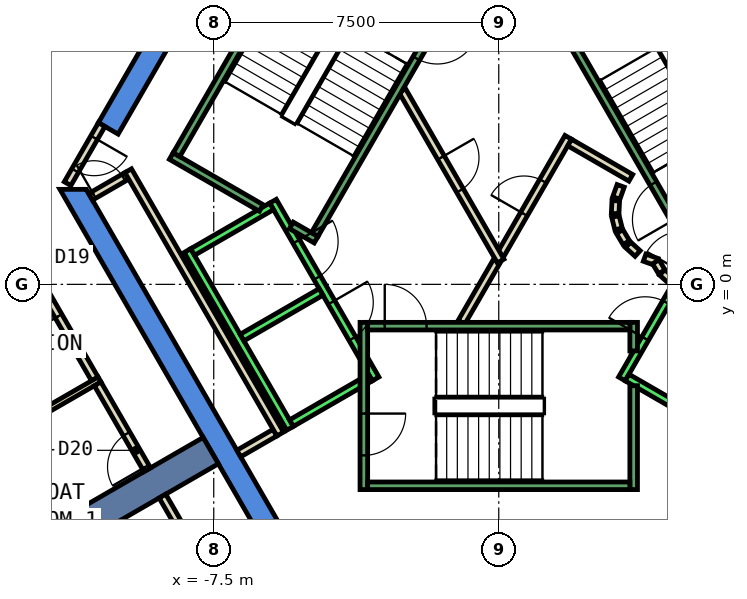
"""IFC4 building model, lengths in metres.
Left out: names, types, materials, properties, quantities, classifications, styles, units other than length and angle.
Written with IfcOpenShell. Run it as: python <this file> out.ifc"""

import sys

from ifc_helpers import new_model, si_unit, direction, frame, frame_2d, origin, place, context, subcontext, project, spatial, polyline, rectangle, outline, extrude, element, fill, save


model = new_model("IFC4")
c1 = context("Model", 3, precision=1e-05, world=origin(), true_north=direction((0.0, 1.0)))
c2 = subcontext(c1, "Body", "Model", "MODEL_VIEW")
j1 = project(units=[si_unit("LENGTHUNIT", "METRE"), si_unit("PLANEANGLEUNIT", "RADIAN")], contexts=[c1])
p1 = place(None, origin())
s1 = spatial("IfcSite", under=j1, at=p1, CompositionType="ELEMENT")
p2 = place(p1, origin())
s2 = spatial("IfcBuilding", under=s1, at=p2, CompositionType="ELEMENT")
p3 = place(p2, frame((0.0, 0.0, 241.4)))
s3 = spatial("IfcBuildingStorey", under=s2, at=p3, CompositionType="ELEMENT", Elevation=241.4)
p4 = place(p3, frame((0.0, 0.0, -0.6)))
e1 = element("IfcWall", 1, at=p4, inside=s3, PredefinedType="SHEAR", context=c2, shape_type="SweptSolid", body=[
    extrude(outline(polyline([(-10.535, 4.253), (-10.015, 3.953), (-5.427, 11.9), (-5.774, 12.5), (-10.535, 4.253)])), origin(), (0.0, 0.0, 1.0), 3.86),
])
p5 = place(p3, frame((0.0, 0.0, -0.6)))
e2 = element("IfcWall", 2, at=p5, inside=s3, PredefinedType="SHEAR", context=c2, shape_type="SweptSolid", body=[
    extrude(outline(polyline([(-11.547, 2.5), (-5.774, -7.5), (-5.427, -6.9), (-10.854, 2.5), (-11.547, 2.5)])), origin(), (0.0, 0.0, 1.0), 3.86),
])
p6 = place(p3, frame((-7.578, -4.375, -0.6), z_axis=(0.0, 0.0, 1.0), x_axis=(-0.866024315419, -0.5000018851, 0.0)))
e3 = element("IfcWall", 3, at=p6, inside=s3, PredefinedType="SHEAR", context=c2, shape_type="SweptSolid", body=[
    extrude(rectangle(XDim=9.0, YDim=0.8, at=frame_2d((4.5, 0.0))), origin(), (0.0, 0.0, 1.0), 3.86),
])
p7 = place(p3, frame((-10.63, -2.488, 0.0), z_axis=(0.0, 0.0, 1.0), x_axis=(-0.500108649621, 0.865962665808, 0.0)))
e4 = element("IfcWall", 4, at=p7, inside=s3, PredefinedType="PARTITIONING", context=c2, shape_type="SweptSolid", body=[
    extrude(rectangle(XDim=4.815, YDim=0.2, at=frame_2d((2.408, 0.0))), origin(), (0.0, 0.0, 1.0), 3.26),
])
p8 = place(p7, frame((1.908, 0.0, 0.0)))
e5 = element("IfcOpeningElement", 5, at=p8, cuts=e4, PredefinedType="OPENING", context=c2, shape_type="SweptSolid", body=[
    extrude(rectangle(XDim=1.0, YDim=2.1, at=frame_2d((0.5, 1.05))), frame((0.0, 0.11, 0.0), z_axis=(0.0, -1.0, 0.0), x_axis=(1.0, 0.0, 0.0)), (0.0, 0.0, 1.0), 0.22),
])
p9 = place(p3, frame((-8.235, -6.636, 0.0), z_axis=(0.0, 0.0, 1.0), x_axis=(-0.500089055364, 0.86597398154, 0.0)))
e6 = element("IfcWall", 6, at=p9, inside=s3, PredefinedType="PARTITIONING", context=c2, shape_type="SweptSolid", body=[
    extrude(rectangle(XDim=1.23, YDim=0.2, at=frame_2d((0.615, 0.0))), origin(), (0.0, 0.0, 1.0), 3.26),
])
p10 = place(p3, frame((-5.888, -3.902, 0.0), z_axis=(0.0, 0.0, 1.0), x_axis=(-0.86621513555, -0.499671230855, 0.0)))
e7 = element("IfcWall", 7, at=p10, inside=s3, PredefinedType="PARTITIONING", context=c2, shape_type="SweptSolid", body=[
    extrude(rectangle(XDim=1.1, YDim=0.2, at=frame_2d((0.55, 0.0))), origin(), (0.0, 0.0, 1.0), 3.26),
])
p11 = place(p3, frame((-10.741, 2.303, 0.0), z_axis=(0.0, 0.0, 1.0), x_axis=(0.866063652425, 0.499933745558, 0.0)))
e8 = element("IfcWall", 8, at=p11, inside=s3, PredefinedType="PARTITIONING", context=c2, shape_type="SweptSolid", body=[
    extrude(rectangle(XDim=1.1, YDim=0.2, at=frame_2d((0.55, 0.0))), origin(), (0.0, 0.0, 1.0), 3.26),
])
p12 = place(p11, frame((0.1, 0.0, 0.0)))
e9 = element("IfcOpeningElement", 9, at=p12, cuts=e8, PredefinedType="OPENING", context=c2, shape_type="SweptSolid", body=[
    extrude(rectangle(XDim=0.9, YDim=2.1, at=frame_2d((0.45, 1.05))), frame((0.0, 0.11, 0.0), z_axis=(0.0, -1.0, 0.0), x_axis=(1.0, 0.0, 0.0)), (0.0, 0.0, 1.0), 0.22),
])
p13 = place(p3, frame((-9.751, 2.99, 0.0), z_axis=(0.0, 0.0, 1.0), x_axis=(0.500012163284, -0.866018381195, 0.0)))
e10 = element("IfcWall", 10, at=p13, inside=s3, PredefinedType="PARTITIONING", context=c2, shape_type="SweptSolid", body=[
    extrude(rectangle(XDim=8.0, YDim=0.2, at=frame_2d((4.0, 0.0))), origin(), (0.0, 0.0, 1.0), 3.26),
])
p14 = place(p3, frame((-0.982, -1.0, 0.0), z_axis=(0.0, 0.0, 1.0), x_axis=(0.50024047865, 0.865886518847, 0.0)))
e11 = element("IfcWall", 11, at=p14, inside=s3, PredefinedType="PARTITIONING", context=c2, shape_type="SweptSolid", body=[
    extrude(rectangle(XDim=1.863, YDim=0.2, at=frame_2d((0.931, 0.0))), origin(), (0.0, 0.0, 1.0), 3.26),
])
p15 = place(p3, frame((0.05, 0.787, 0.0), z_axis=(0.0, 0.0, 1.0), x_axis=(0.499954076797, 0.866051915934, 0.0)))
e12 = element("IfcWall", 12, at=p15, inside=s3, PredefinedType="PARTITIONING", context=c2, shape_type="SweptSolid", body=[
    extrude(rectangle(XDim=3.558, YDim=0.2, at=frame_2d((1.779, 0.0))), origin(), (0.0, 0.0, 1.0), 3.26),
])
p16 = place(p15, frame((1.229, 0.0, 0.0)))
e13 = element("IfcOpeningElement", 13, at=p16, cuts=e12, PredefinedType="OPENING", context=c2, shape_type="SweptSolid", body=[
    extrude(rectangle(XDim=1.0, YDim=2.1, at=frame_2d((0.5, 1.05))), frame((0.0, 0.11, 0.0), z_axis=(0.0, -1.0, 0.0), x_axis=(1.0, 0.0, 0.0)), (0.0, 0.0, 1.0), 0.22),
])
p17 = place(p3, frame((1.866, 3.732, 0.0), z_axis=(0.0, 0.0, 1.0), x_axis=(0.866043361281, -0.499968895414, 0.0)))
e14 = element("IfcWall", 14, at=p17, inside=s3, PredefinedType="PARTITIONING", context=c2, shape_type="SweptSolid", body=[
    extrude(rectangle(XDim=1.858, YDim=0.2, at=frame_2d((0.929, 0.0))), origin(), (0.0, 0.0, 1.0), 3.26),
])
p18 = place(p3, frame((3.208, 2.592, 0.0), z_axis=(0.0, 0.0, 1.0), x_axis=(-0.337388820924, -0.941365382578, 0.0)))
e15 = element("IfcWall", 15, at=p18, inside=s3, PredefinedType="PARTITIONING", context=c2, shape_type="SweptSolid", body=[
    extrude(rectangle(XDim=0.338, YDim=0.2, at=frame_2d((0.169, 0.0))), origin(), (0.0, 0.0, 1.0), 3.26),
])
p19 = place(p3, frame((3.079, 2.199, 0.0), z_axis=(0.0, 0.0, 1.0), x_axis=(-0.047771483479, -0.998858290933, 0.0)))
e16 = element("IfcWall", 16, at=p19, inside=s3, PredefinedType="PARTITIONING", context=c2, shape_type="SweptSolid", body=[
    extrude(rectangle(XDim=0.337, YDim=0.2, at=frame_2d((0.169, 0.0))), origin(), (0.0, 0.0, 1.0), 3.26),
])
p20 = place(p3, frame((3.07, 1.786, 0.0), z_axis=(0.0, 0.0, 1.0), x_axis=(0.242705583207, -0.970099994784, 0.0)))
e17 = element("IfcWall", 17, at=p20, inside=s3, PredefinedType="PARTITIONING", context=c2, shape_type="SweptSolid", body=[
    extrude(rectangle(XDim=0.338, YDim=0.2, at=frame_2d((0.169, 0.0))), origin(), (0.0, 0.0, 1.0), 3.26),
])
for number, where, z_axis, x_axis in (
    (18, (3.182, 1.388, 0.0), (0.0, 0.0, 1.0), (0.512, -0.859, 0.0)),
    (19, (3.404, 1.039, 0.0), (0.0, 0.0, 1.0), (0.74, -0.672, 0.0)),
):
    element("IfcWall", number, at=place(p3, frame(where, z_axis=z_axis, x_axis=x_axis)), inside=s3, PredefinedType="PARTITIONING", context=c2, shape_type="SweptSolid", body=[
        extrude(rectangle(XDim=0.338, YDim=0.2, at=frame_2d((0.169, 0.0))), origin(), (0.0, 0.0, 1.0), 3.26),
    ])
p21 = place(p3, frame((3.838, 0.702, 0.0), z_axis=(0.0, 0.0, 1.0), x_axis=(0.941035081519, -0.338308993895, 0.0)))
e20 = element("IfcWall", 20, at=p21, inside=s3, PredefinedType="PARTITIONING", context=c2, shape_type="SweptSolid", body=[
    extrude(rectangle(XDim=0.337, YDim=0.2, at=frame_2d((0.168, 0.0))), origin(), (0.0, 0.0, 1.0), 3.26),
])
p22 = place(p3, frame((4.132, 0.593, 0.0), z_axis=(0.0, 0.0, 1.0), x_axis=(0.513561617048, -0.858052717201, 0.0)))
e21 = element("IfcWall", 21, at=p22, inside=s3, PredefinedType="PARTITIONING", context=c2, shape_type="SweptSolid", body=[
    extrude(rectangle(XDim=0.308, YDim=0.2, at=frame_2d((0.154, 0.0))), origin(), (0.0, 0.0, 1.0), 3.26),
])
p23 = place(p3, frame((4.301, 0.315, 0.0), z_axis=(0.0, 0.0, 1.0), x_axis=(0.741798017506, -0.670623367639, 0.0)))
e22 = element("IfcWall", 22, at=p23, inside=s3, PredefinedType="PARTITIONING", context=c2, shape_type="SweptSolid", body=[
    extrude(rectangle(XDim=0.309, YDim=0.2, at=frame_2d((0.154, 0.0))), origin(), (0.0, 0.0, 1.0), 3.26),
])
p24 = place(p3, frame((-2.54, 5.1, 0.0), z_axis=(0.0, 0.0, 1.0), x_axis=(0.499925051871, -0.866068670783, 0.0)))
e23 = element("IfcWall", 23, at=p24, inside=s3, PredefinedType="PARTITIONING", context=c2, shape_type="SweptSolid", body=[
    extrude(rectangle(XDim=5.181, YDim=0.2, at=frame_2d((2.59, 0.0))), origin(), (0.0, 0.0, 1.0), 3.26),
])
p25 = place(p24, frame((2.04, 0.0, 0.0)))
e24 = element("IfcOpeningElement", 24, at=p25, cuts=e23, PredefinedType="OPENING", context=c2, shape_type="SweptSolid", body=[
    extrude(rectangle(XDim=1.0, YDim=2.1, at=frame_2d((0.5, 1.05))), frame((0.0, 0.11, 0.0), z_axis=(0.0, -1.0, 0.0), x_axis=(1.0, 0.0, 0.0)), (0.0, 0.0, 1.0), 0.22),
])
p26 = place(p3, frame((-10.506, -2.503, 0.0), z_axis=(0.0, 0.0, 1.0), x_axis=(-0.866044872465, -0.49996627774, 0.0)))
e25 = element("IfcWall", 25, at=p26, inside=s3, PredefinedType="PARTITIONING", context=c2, shape_type="SweptSolid", body=[
    extrude(rectangle(XDim=5.2, YDim=0.15, at=frame_2d((2.6, 0.0))), origin(), (0.0, 0.0, 1.0), 3.26),
])
p27 = place(p3, frame((-10.449, 4.203, 0.0), z_axis=(0.0, 0.0, 1.0), x_axis=(-0.499914839587, -0.866074565589, 0.0)))
e26 = element("IfcWall", 26, at=p27, inside=s3, PredefinedType="PARTITIONING", context=c2, shape_type="SweptSolid", body=[
    extrude(rectangle(XDim=1.794, YDim=0.2, at=frame_2d((0.897, 0.0))), origin(), (0.0, 0.0, 1.0), 2.4),
])
p28 = place(p27, frame((0.397, 0.0, 0.0)))
e27 = element("IfcOpeningElement", 27, at=p28, cuts=e26, PredefinedType="OPENING", context=c2, shape_type="SweptSolid", body=[
    extrude(rectangle(XDim=1.0, YDim=2.1, at=frame_2d((0.5, 1.05))), frame((0.0, 0.11, 0.0), z_axis=(0.0, -1.0, 0.0), x_axis=(1.0, 0.0, 0.0)), (0.0, 0.0, 1.0), 0.22),
])
p29 = place(p3, frame((-9.25, -4.878, 0.0), z_axis=(0.0, 0.0, 1.0), x_axis=(-0.500032875382, 0.866006422342, 0.0)))
e28 = element("IfcWall", 28, at=p29, inside=s3, PredefinedType="PARTITIONING", context=c2, shape_type="SweptSolid", body=[
    extrude(rectangle(XDim=2.61, YDim=0.2, at=frame_2d((1.305, 0.0))), origin(), (0.0, 0.0, 1.0), 3.26),
])
p30 = place(p29, frame((0.09, 0.0, 0.0)))
e29 = element("IfcOpeningElement", 29, at=p30, cuts=e28, PredefinedType="OPENING", context=c2, shape_type="SweptSolid", body=[
    extrude(rectangle(XDim=1.0, YDim=2.1, at=frame_2d((0.5, 1.05))), frame((0.0, 0.11, 0.0), z_axis=(0.0, -1.0, 0.0), x_axis=(1.0, 0.0, 0.0)), (0.0, 0.0, 1.0), 0.22),
])
p31 = place(p3, frame((-5.94, 2.188, 0.0), z_axis=(0.0, 0.0, 1.0), x_axis=(0.500034260056, -0.866005622828, 0.0)))
e30 = element("IfcWall", 30, at=p31, inside=s3, PredefinedType="STANDARD", context=c2, shape_type="SweptSolid", body=[
    extrude(rectangle(XDim=5.399, YDim=0.2, at=frame_2d((2.7, 0.0))), origin(), (0.0, 0.0, 1.0), 3.26),
])
p32 = place(p31, frame((3.075, 0.0, 0.0)))
e31 = element("IfcOpeningElement", 31, at=p32, cuts=e30, PredefinedType="OPENING", context=c2, shape_type="SweptSolid", body=[
    extrude(rectangle(XDim=1.1, YDim=2.1, at=frame_2d((0.55, 1.05))), frame((0.0, 0.11, 0.0), z_axis=(0.0, -1.0, 0.0), x_axis=(1.0, 0.0, 0.0)), (0.0, 0.0, 1.0), 0.22),
])
p33 = place(p31, frame((1.225, 0.0, 0.0)))
e32 = element("IfcOpeningElement", 32, at=p33, cuts=e30, PredefinedType="OPENING", context=c2, shape_type="SweptSolid", body=[
    extrude(rectangle(XDim=1.1, YDim=2.1, at=frame_2d((0.55, 1.05))), frame((0.0, 0.11, 0.0), z_axis=(0.0, -1.0, 0.0), x_axis=(1.0, 0.0, 0.0)), (0.0, 0.0, 1.0), 0.22),
])
p34 = place(p3, frame((-8.192, 0.888, 0.0), z_axis=(0.0, 0.0, 1.0), x_axis=(0.500034260056, -0.866005622828, 0.0)))
e33 = element("IfcWall", 33, at=p34, inside=s3, PredefinedType="STANDARD", context=c2, shape_type="SweptSolid", body=[
    extrude(rectangle(XDim=5.399, YDim=0.2, at=frame_2d((2.7, 0.0))), origin(), (0.0, 0.0, 1.0), 3.26),
])
for number, where, z_axis, x_axis in (
    (34, (-5.977, 2.052, 0.0), (0.0, 0.0, 1.0), (-0.866, -0.5, 0.0)),
    (35, (-4.677, -0.2, 0.0), (0.0, 0.0, 1.0), (-0.866, -0.5, 0.0)),
):
    element("IfcWall", number, at=place(p3, frame(where, z_axis=z_axis, x_axis=x_axis)), inside=s3, PredefinedType="STANDARD", context=c2, shape_type="SweptSolid", body=[
        extrude(rectangle(XDim=2.399, YDim=0.2, at=frame_2d((1.2, 0.0))), origin(), (0.0, 0.0, 1.0), 3.26),
    ])
p35 = place(p3, frame((-3.377, -2.452, 0.0), z_axis=(0.0, 0.0, 1.0), x_axis=(-0.865955154139, -0.50012165622, 0.0)))
e36 = element("IfcWall", 36, at=p35, inside=s3, PredefinedType="STANDARD", context=c2, shape_type="SweptSolid", body=[
    extrude(rectangle(XDim=2.4, YDim=0.2, at=frame_2d((1.2, 0.0))), origin(), (0.0, 0.0, 1.0), 3.26),
])
p36 = place(p3, frame((3.24, -2.488, 0.0), z_axis=(0.0, 0.0, 1.0), x_axis=(0.500034260056, 0.866005622828, 0.0)))
e37 = element("IfcWall", 37, at=p36, inside=s3, PredefinedType="STANDARD", context=c2, shape_type="SweptSolid", body=[
    extrude(rectangle(XDim=5.399, YDim=0.2, at=frame_2d((2.7, 0.0))), origin(), (0.0, 0.0, 1.0), 3.26),
])
p37 = place(p36, frame((3.225, 0.0, 0.0)))
e38 = element("IfcOpeningElement", 38, at=p37, cuts=e37, PredefinedType="OPENING", context=c2, shape_type="SweptSolid", body=[
    extrude(rectangle(XDim=1.1, YDim=2.1, at=frame_2d((0.55, 1.05))), frame((0.0, 0.11, 0.0), z_axis=(0.0, -1.0, 0.0), x_axis=(1.0, 0.0, 0.0)), (0.0, 0.0, 1.0), 0.22),
])
p38 = place(p36, frame((1.225, 0.0, 0.0)))
e39 = element("IfcOpeningElement", 39, at=p38, cuts=e37, PredefinedType="OPENING", context=c2, shape_type="SweptSolid", body=[
    extrude(rectangle(XDim=1.1, YDim=2.1, at=frame_2d((0.55, 1.05))), frame((0.0, 0.11, 0.0), z_axis=(0.0, -1.0, 0.0), x_axis=(1.0, 0.0, 0.0)), (0.0, 0.0, 1.0), 0.22),
])
p39 = place(p3, frame((3.377, -2.452, 0.0), z_axis=(0.0, 0.0, 1.0), x_axis=(0.865955154139, -0.50012165622, 0.0)))
e40 = element("IfcWall", 40, at=p39, inside=s3, PredefinedType="STANDARD", context=c2, shape_type="SweptSolid", body=[
    extrude(rectangle(XDim=2.4, YDim=0.2, at=frame_2d((1.2, 0.0))), origin(), (0.0, 0.0, 1.0), 3.26),
])
p40 = place(p3, frame((-3.55, -1.0, 0.0), z_axis=(0.0, 0.0, 1.0), x_axis=(0.0, -1.0, 0.0)))
e41 = element("IfcWall", 41, at=p40, inside=s3, PredefinedType="STANDARD", context=c2, shape_type="SweptSolid", body=[
    extrude(rectangle(XDim=4.4, YDim=0.2, at=frame_2d((2.2, 0.0))), origin(), (0.0, 0.0, 1.0), 3.26),
])
p41 = place(p40, frame((2.4, 0.0, 0.0)))
e42 = element("IfcOpeningElement", 42, at=p41, cuts=e41, PredefinedType="OPENING", context=c2, shape_type="SweptSolid", body=[
    extrude(rectangle(XDim=1.1, YDim=2.2, at=frame_2d((0.55, 1.1))), frame((0.0, 0.11, 0.0), z_axis=(0.0, -1.0, 0.0), x_axis=(1.0, 0.0, 0.0)), (0.0, 0.0, 1.0), 0.22),
])
p42 = place(p3, frame((3.55, -2.667, 0.0), z_axis=(0.0, 0.0, 1.0), x_axis=(0.0, -1.0, 0.0)))
e43 = element("IfcWall", 43, at=p42, inside=s3, PredefinedType="STANDARD", context=c2, shape_type="SweptSolid", body=[
    extrude(rectangle(XDim=2.733, YDim=0.2, at=frame_2d((1.366, 0.0))), origin(), (0.0, 0.0, 1.0), 3.26),
])
p43 = place(p3, frame((3.55, -1.0, 0.0), z_axis=(0.0, 0.0, 1.0), x_axis=(0.0, -1.0, 0.0)))
e44 = element("IfcWall", 44, at=p43, inside=s3, PredefinedType="STANDARD", context=c2, shape_type="SweptSolid", body=[
    extrude(rectangle(XDim=0.751, YDim=0.2, at=frame_2d((0.375, 0.0))), origin(), (0.0, 0.0, 1.0), 3.26),
])
p44 = place(p3, frame((-3.45, -1.1, 0.0), z_axis=(0.0, 0.0, 1.0), x_axis=(1.0, 0.0, 0.0)))
e45 = element("IfcWall", 45, at=p44, inside=s3, PredefinedType="STANDARD", context=c2, shape_type="SweptSolid", body=[
    extrude(rectangle(XDim=6.9, YDim=0.2, at=frame_2d((3.45, 0.0))), origin(), (0.0, 0.0, 1.0), 3.26),
])
p45 = place(p44, frame((0.45, 0.0, 0.0)))
e46 = element("IfcOpeningElement", 46, at=p45, cuts=e45, PredefinedType="OPENING", context=c2, shape_type="SweptSolid", body=[
    extrude(rectangle(XDim=1.1, YDim=2.2, at=frame_2d((0.55, 1.1))), frame((0.0, 0.11, 0.0), z_axis=(0.0, -1.0, 0.0), x_axis=(1.0, 0.0, 0.0)), (0.0, 0.0, 1.0), 0.22),
])
p46 = place(p3, frame((-3.45, -5.3, 0.0), z_axis=(0.0, 0.0, 1.0), x_axis=(1.0, 0.0, 0.0)))
e47 = element("IfcWall", 47, at=p46, inside=s3, PredefinedType="STANDARD", context=c2, shape_type="SweptSolid", body=[
    extrude(rectangle(XDim=6.9, YDim=0.2, at=frame_2d((3.45, 0.0))), origin(), (0.0, 0.0, 1.0), 3.26),
])
p47 = place(p3, frame((4.843, 1.312, 0.0), z_axis=(0.0, 0.0, 1.0), x_axis=(-0.499963383562, 0.866046543262, 0.0)))
e48 = element("IfcWall", 48, at=p47, inside=s3, PredefinedType="STANDARD", context=c2, shape_type="SweptSolid", body=[
    extrude(rectangle(XDim=6.9, YDim=0.2, at=frame_2d((3.45, 0.0))), origin(), (0.0, 0.0, 1.0), 3.26),
])
p48 = place(p47, frame((0.45, 0.0, 0.0)))
e49 = element("IfcOpeningElement", 49, at=p48, cuts=e48, PredefinedType="OPENING", context=c2, shape_type="SweptSolid", body=[
    extrude(rectangle(XDim=1.1, YDim=2.2, at=frame_2d((0.55, 1.1))), frame((0.0, 0.11, 0.0), z_axis=(0.0, -1.0, 0.0), x_axis=(1.0, 0.0, 0.0)), (0.0, 0.0, 1.0), 0.22),
])
p49 = place(p3, frame((-6.25, 2.01, 0.0), z_axis=(0.0, 0.0, 1.0), x_axis=(-0.86611865017, 0.499838457731, 0.0)))
e50 = element("IfcWall", 50, at=p49, inside=s3, PredefinedType="STANDARD", context=c2, shape_type="SweptSolid", body=[
    extrude(rectangle(XDim=2.733, YDim=0.2, at=frame_2d((1.366, 0.0))), origin(), (0.0, 0.0, 1.0), 3.26),
])
p50 = place(p3, frame((-4.806, 1.176, 0.0), z_axis=(0.0, 0.0, 1.0), x_axis=(-0.866558586415, 0.499075361355, 0.0)))
e51 = element("IfcWall", 51, at=p50, inside=s3, PredefinedType="STANDARD", context=c2, shape_type="SweptSolid", body=[
    extrude(rectangle(XDim=0.751, YDim=0.2, at=frame_2d((0.376, 0.0))), origin(), (0.0, 0.0, 1.0), 3.26),
])
p51 = place(p3, frame((-1.393, 7.288, 0.0), z_axis=(0.0, 0.0, 1.0), x_axis=(-0.499963383562, -0.866046543262, 0.0)))
e52 = element("IfcWall", 52, at=p51, inside=s3, PredefinedType="STANDARD", context=c2, shape_type="SweptSolid", body=[
    extrude(rectangle(XDim=6.9, YDim=0.2, at=frame_2d((3.45, 0.0))), origin(), (0.0, 0.0, 1.0), 3.26),
])
p52 = place(p51, frame((0.45, 0.0, 0.0)))
e53 = element("IfcOpeningElement", 53, at=p52, cuts=e52, PredefinedType="OPENING", context=c2, shape_type="SweptSolid", body=[
    extrude(rectangle(XDim=1.1, YDim=2.2, at=frame_2d((0.55, 1.1))), frame((0.0, 0.11, 0.0), z_axis=(0.0, -1.0, 0.0), x_axis=(1.0, 0.0, 0.0)), (0.0, 0.0, 1.0), 0.22),
])
p53 = place(p3, frame((-5.03, 9.388, 0.0), z_axis=(0.0, 0.0, 1.0), x_axis=(-0.499978703459, -0.866037698999, 0.0)))
e54 = element("IfcWall", 54, at=p53, inside=s3, PredefinedType="STANDARD", context=c2, shape_type="SweptSolid", body=[
    extrude(rectangle(XDim=6.9, YDim=0.2, at=frame_2d((3.45, 0.0))), origin(), (0.0, 0.0, 1.0), 3.26),
])
p54 = place(p8, origin())
e55 = element("IfcDoor", 55, at=p54, inside=s3, OperationType="SINGLE_SWING_LEFT", PredefinedType="DOOR", context=c2, shape_type="SweptSolid", body=[
    extrude(rectangle(XDim=1.0, YDim=2.1, at=frame_2d((0.5, 1.05))), frame((0.0, 0.025, 0.0), z_axis=(0.0, -1.0, 0.0), x_axis=(1.0, 0.0, 0.0)), (0.0, 0.0, 1.0), 0.05),
])
fill(e5, e55)
p55 = place(p30, origin())
e56 = element("IfcDoor", 56, at=p55, inside=s3, OperationType="SINGLE_SWING_LEFT", PredefinedType="DOOR", context=c2, shape_type="SweptSolid", body=[
    extrude(rectangle(XDim=1.0, YDim=2.1, at=frame_2d((0.5, 1.05))), frame((0.0, 0.025, 0.0), z_axis=(0.0, -1.0, 0.0), x_axis=(1.0, 0.0, 0.0)), (0.0, 0.0, 1.0), 0.05),
])
fill(e29, e56)
p56 = place(p16, origin())
e57 = element("IfcDoor", 57, at=p56, inside=s3, OperationType="SINGLE_SWING_RIGHT", PredefinedType="DOOR", context=c2, shape_type="SweptSolid", body=[
    extrude(rectangle(XDim=1.0, YDim=2.1, at=frame_2d((0.5, 1.05))), frame((0.0, 0.025, 0.0), z_axis=(0.0, -1.0, 0.0), x_axis=(1.0, 0.0, 0.0)), (0.0, 0.0, 1.0), 0.05),
])
fill(e13, e57)
p57 = place(p25, origin())
e58 = element("IfcDoor", 58, at=p57, inside=s3, OperationType="SINGLE_SWING_RIGHT", PredefinedType="DOOR", context=c2, shape_type="SweptSolid", body=[
    extrude(rectangle(XDim=1.0, YDim=2.1, at=frame_2d((0.5, 1.05))), frame((0.0, 0.025, 0.0), z_axis=(0.0, -1.0, 0.0), x_axis=(1.0, 0.0, 0.0)), (0.0, 0.0, 1.0), 0.05),
])
fill(e24, e58)
p58 = place(p12, origin())
e59 = element("IfcDoor", 59, at=p58, inside=s3, OperationType="SINGLE_SWING_RIGHT", PredefinedType="DOOR", context=c2, shape_type="SweptSolid", body=[
    extrude(rectangle(XDim=0.9, YDim=2.1, at=frame_2d((0.45, 1.05))), frame((0.0, 0.025, 0.0), z_axis=(0.0, -1.0, 0.0), x_axis=(1.0, 0.0, 0.0)), (0.0, 0.0, 1.0), 0.05),
])
fill(e9, e59)
p59 = place(p28, origin())
e60 = element("IfcDoor", 60, at=p59, inside=s3, OperationType="SINGLE_SWING_LEFT", PredefinedType="DOOR", context=c2, shape_type="SweptSolid", body=[
    extrude(rectangle(XDim=1.0, YDim=2.1, at=frame_2d((0.5, 1.05))), frame((0.0, 0.025, 0.0), z_axis=(0.0, -1.0, 0.0), x_axis=(1.0, 0.0, 0.0)), (0.0, 0.0, 1.0), 0.05),
])
fill(e27, e60)
p60 = place(p32, origin())
e61 = element("IfcDoor", 61, at=p60, inside=s3, OperationType="SLIDING_TO_LEFT", PredefinedType="DOOR", context=c2, shape_type="SweptSolid", body=[
    extrude(rectangle(XDim=1.1, YDim=2.1, at=frame_2d((0.55, 1.05))), frame((0.0, 0.025, 0.0), z_axis=(0.0, -1.0, 0.0), x_axis=(1.0, 0.0, 0.0)), (0.0, 0.0, 1.0), 0.05),
])
fill(e31, e61)
p61 = place(p38, origin())
e62 = element("IfcDoor", 62, at=p61, inside=s3, OperationType="SLIDING_TO_LEFT", PredefinedType="DOOR", context=c2, shape_type="SweptSolid", body=[
    extrude(rectangle(XDim=1.1, YDim=2.1, at=frame_2d((0.55, 1.05))), frame((0.0, 0.025, 0.0), z_axis=(0.0, -1.0, 0.0), x_axis=(1.0, 0.0, 0.0)), (0.0, 0.0, 1.0), 0.05),
])
fill(e39, e62)
p62 = place(p33, origin())
e63 = element("IfcDoor", 63, at=p62, inside=s3, OperationType="SLIDING_TO_LEFT", PredefinedType="DOOR", context=c2, shape_type="SweptSolid", body=[
    extrude(rectangle(XDim=1.1, YDim=2.1, at=frame_2d((0.55, 1.05))), frame((0.0, 0.025, 0.0), z_axis=(0.0, -1.0, 0.0), x_axis=(1.0, 0.0, 0.0)), (0.0, 0.0, 1.0), 0.05),
])
fill(e32, e63)
p63 = place(p45, origin())
e64 = element("IfcDoor", 64, at=p63, inside=s3, OperationType="SINGLE_SWING_LEFT", PredefinedType="DOOR", context=c2, shape_type="SweptSolid", body=[
    extrude(rectangle(XDim=1.1, YDim=2.2, at=frame_2d((0.55, 1.1))), frame((0.0, 0.025, 0.0), z_axis=(0.0, -1.0, 0.0), x_axis=(1.0, 0.0, 0.0)), (0.0, 0.0, 1.0), 0.05),
])
fill(e46, e64)
p64 = place(p41, origin())
e65 = element("IfcDoor", 65, at=p64, inside=s3, OperationType="SINGLE_SWING_LEFT", PredefinedType="DOOR", context=c2, shape_type="SweptSolid", body=[
    extrude(rectangle(XDim=1.1, YDim=2.2, at=frame_2d((0.55, 1.1))), frame((0.0, 0.025, 0.0), z_axis=(0.0, -1.0, 0.0), x_axis=(1.0, 0.0, 0.0)), (0.0, 0.0, 1.0), 0.05),
])
fill(e42, e65)
p65 = place(p48, origin())
e66 = element("IfcDoor", 66, at=p65, inside=s3, OperationType="SINGLE_SWING_LEFT", PredefinedType="DOOR", context=c2, shape_type="SweptSolid", body=[
    extrude(rectangle(XDim=1.1, YDim=2.2, at=frame_2d((0.55, 1.1))), frame((0.0, 0.025, 0.0), z_axis=(0.0, -1.0, 0.0), x_axis=(1.0, 0.0, 0.0)), (0.0, 0.0, 1.0), 0.05),
])
fill(e49, e66)
p66 = place(p52, origin())
e67 = element("IfcDoor", 67, at=p66, inside=s3, OperationType="SINGLE_SWING_LEFT", PredefinedType="DOOR", context=c2, shape_type="SweptSolid", body=[
    extrude(rectangle(XDim=1.1, YDim=2.2, at=frame_2d((0.55, 1.1))), frame((0.0, 0.025, 0.0), z_axis=(0.0, -1.0, 0.0), x_axis=(1.0, 0.0, 0.0)), (0.0, 0.0, 1.0), 0.05),
])
fill(e53, e67)
save(model, sys.argv[1])
